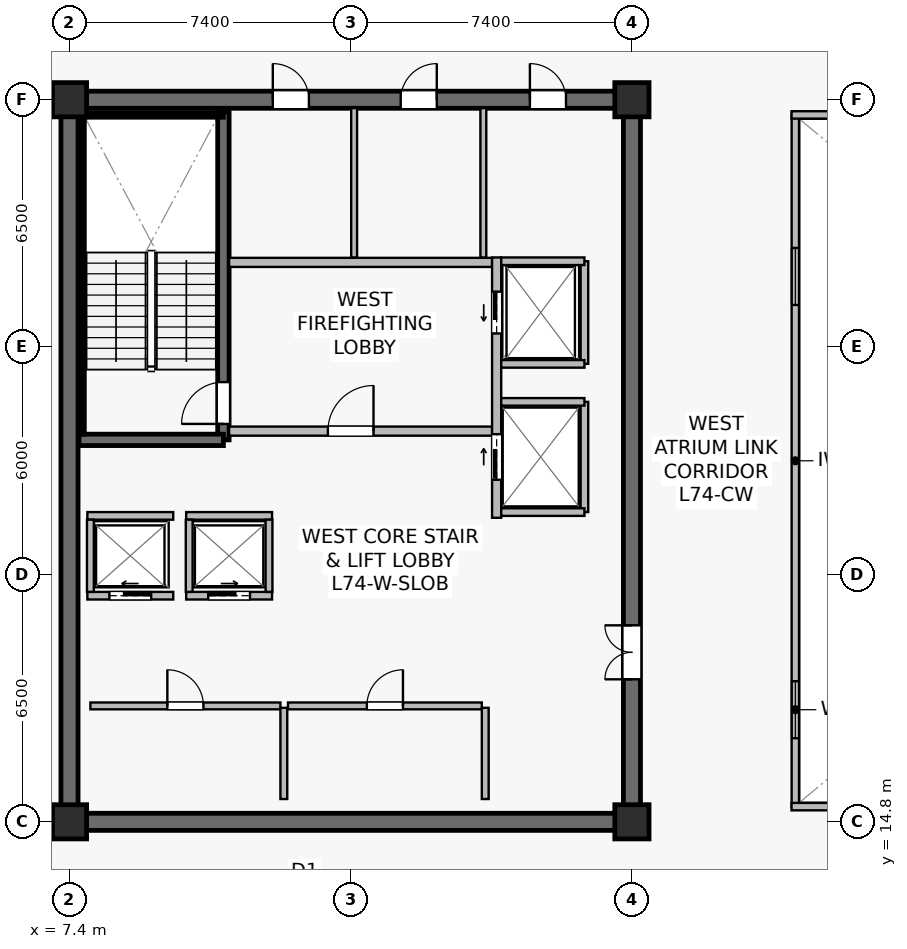
"""IFC4 building model, lengths in metres.
Left out: names, types, materials, properties, quantities, classifications, styles, units other than length and angle.
Written with IfcOpenShell. Run it as: python <this file> out.ifc"""

import sys

from ifc_helpers import new_model, si_unit, direction, frame, frame_2d, origin, origin_2d, place, context, subcontext, project, spatial, rectangle, extrude, source, transform, mapped, element, fill, save


model = new_model("IFC4")
c1 = context("Model", 3, precision=1e-05, world=origin(), true_north=direction((0.0, 1.0)))
c2 = subcontext(c1, "Body", "Model", "MODEL_VIEW")
j1 = project(units=[si_unit("LENGTHUNIT", "METRE"), si_unit("PLANEANGLEUNIT", "RADIAN")], contexts=[c1])
p1 = place(None, origin())
s1 = spatial("IfcSite", under=j1, at=p1, CompositionType="ELEMENT")
p2 = place(p1, origin())
s2 = spatial("IfcBuilding", under=s1, at=p2, CompositionType="ELEMENT")
p3 = place(p2, frame((0.0, 0.0, 310.2)))
s3 = spatial("IfcBuildingStorey", under=s2, at=p3, CompositionType="ELEMENT", Elevation=310.2)
p4 = place(p3, frame((7.175, 14.8, 0.0), z_axis=(0.0, 0.0, 1.0), x_axis=(1.0, 0.0, 0.0)))
e1 = element("IfcWall", 1, at=p4, inside=s3, PredefinedType="SHEAR", context=c2, shape_type="SweptSolid", body=[
    extrude(rectangle(XDim=15.25, YDim=0.45, at=frame_2d((7.625, 0.0))), origin(), (0.0, 0.0, 1.0), 3.9),
])
p5 = place(p3, frame((7.175, 33.8, 0.0), z_axis=(0.0, 0.0, 1.0), x_axis=(1.0, 0.0, 0.0)))
e2 = element("IfcWall", 2, at=p5, inside=s3, PredefinedType="SHEAR", context=c2, shape_type="SweptSolid", body=[
    extrude(rectangle(XDim=15.25, YDim=0.45, at=frame_2d((7.625, 0.0))), origin(), (0.0, 0.0, 1.0), 3.9),
])
p6 = place(p5, frame((5.575, 0.0, 0.0)))
e3 = element("IfcOpeningElement", 3, at=p6, cuts=e2, PredefinedType="OPENING", context=c2, shape_type="SweptSolid", body=[
    extrude(rectangle(XDim=0.95, YDim=2.15, at=frame_2d((0.475, 1.075))), frame((0.0, 0.235, 0.0), z_axis=(0.0, -1.0, 0.0), x_axis=(1.0, 0.0, 0.0)), (0.0, 0.0, 1.0), 0.47),
])
p7 = place(p5, frame((8.94, 0.0, 0.0)))
e4 = element("IfcOpeningElement", 4, at=p7, cuts=e2, PredefinedType="OPENING", context=c2, shape_type="SweptSolid", body=[
    extrude(rectangle(XDim=0.95, YDim=2.15, at=frame_2d((0.475, 1.075))), frame((0.0, 0.235, 0.0), z_axis=(0.0, -1.0, 0.0), x_axis=(1.0, 0.0, 0.0)), (0.0, 0.0, 1.0), 0.47),
])
p8 = place(p5, frame((12.34, 0.0, 0.0)))
e5 = element("IfcOpeningElement", 5, at=p8, cuts=e2, PredefinedType="OPENING", context=c2, shape_type="SweptSolid", body=[
    extrude(rectangle(XDim=0.95, YDim=2.15, at=frame_2d((0.475, 1.075))), frame((0.0, 0.235, 0.0), z_axis=(0.0, -1.0, 0.0), x_axis=(1.0, 0.0, 0.0)), (0.0, 0.0, 1.0), 0.47),
])
p9 = place(p3, frame((7.4, 15.025, 0.0), z_axis=(0.0, 0.0, 1.0), x_axis=(0.0, 1.0, 0.0)))
e6 = element("IfcWall", 6, at=p9, inside=s3, PredefinedType="SHEAR", context=c2, shape_type="SweptSolid", body=[
    extrude(rectangle(XDim=18.55, YDim=0.45, at=frame_2d((9.275, 0.0))), origin(), (0.0, 0.0, 1.0), 3.9),
])
p10 = place(p3, frame((22.2, 15.025, 0.0), z_axis=(0.0, 0.0, 1.0), x_axis=(0.0, 1.0, 0.0)))
e7 = element("IfcWall", 7, at=p10, inside=s3, PredefinedType="SHEAR", context=c2, shape_type="SweptSolid", body=[
    extrude(rectangle(XDim=18.55, YDim=0.45, at=frame_2d((9.275, 0.0))), origin(), (0.0, 0.0, 1.0), 3.9),
])
p11 = place(p10, frame((3.525, 0.0, 0.0)))
e8 = element("IfcOpeningElement", 8, at=p11, cuts=e7, PredefinedType="OPENING", context=c2, shape_type="SweptSolid", body=[
    extrude(rectangle(XDim=1.42, YDim=2.2, at=frame_2d((0.71, 1.1))), frame((0.0, 0.235, 0.0), z_axis=(0.0, -1.0, 0.0), x_axis=(1.0, 0.0, 0.0)), (0.0, 0.0, 1.0), 0.47),
])
p12 = place(p3, frame((11.45, 24.85, 0.0), z_axis=(0.0, 0.0, 1.0), x_axis=(0.0, 1.0, 0.0)))
e9 = element("IfcWall", 9, at=p12, inside=s3, PredefinedType="SHEAR", context=c2, shape_type="SweptSolid", body=[
    extrude(rectangle(XDim=8.63, YDim=0.3, at=frame_2d((4.315, 0.0))), origin(), (0.0, 0.0, 1.0), 3.9),
])
p13 = place(p12, frame((0.42, 0.0, 0.0)))
e10 = element("IfcOpeningElement", 10, at=p13, cuts=e9, PredefinedType="OPENING", context=c2, shape_type="SweptSolid", body=[
    extrude(rectangle(XDim=1.1, YDim=2.15, at=frame_2d((0.55, 1.075))), frame((0.0, 0.16, 0.0), z_axis=(0.0, -1.0, 0.0), x_axis=(1.0, 0.0, 0.0)), (0.0, 0.0, 1.0), 0.32),
])
p14 = place(p3, frame((7.65, 24.85, 0.0), z_axis=(0.0, 0.0, 1.0), x_axis=(1.0, 0.0, 0.0)))
e11 = element("IfcWall", 11, at=p14, inside=s3, PredefinedType="SHEAR", context=c2, shape_type="SweptSolid", body=[
    extrude(rectangle(XDim=3.8, YDim=0.3, at=frame_2d((1.9, 0.0))), origin(), (0.0, 0.0, 1.0), 3.9),
])
p15 = place(p3, frame((7.73, 33.4, 0.0), z_axis=(0.0, 0.0, 1.0), x_axis=(1.0, 0.0, 0.0)))
e12 = element("IfcWall", 12, at=p15, inside=s3, PredefinedType="SOLIDWALL", context=c2, shape_type="SweptSolid", body=[
    extrude(rectangle(XDim=3.72, YDim=0.12, at=frame_2d((1.86, 0.0))), origin(), (0.0, 0.0, 1.0), 3.9),
])
p16 = place(p3, frame((7.73, 25.0, 0.0), z_axis=(0.0, 0.0, 1.0), x_axis=(0.0, 1.0, 0.0)))
e13 = element("IfcWall", 13, at=p16, inside=s3, PredefinedType="SOLIDWALL", context=c2, shape_type="SweptSolid", body=[
    extrude(rectangle(XDim=8.32, YDim=0.12, at=frame_2d((4.16, 0.0))), origin(), (0.0, 0.0, 1.0), 3.9),
])
m1 = source(origin(), c2, "Body", "SweptSolid", [
    extrude(rectangle(XDim=0.9, YDim=0.9, at=origin_2d()), origin(), (0.0, 0.0, 1.0), 4.2),
])
for number, where, z_axis, x_axis in (
    (14, (7.4, 14.8, 0.0), (0.0, 0.0, 1.0), (1.0, 0.0, 0.0)),
    (15, (22.2, 14.8, 0.0), (0.0, 0.0, 1.0), (1.0, 0.0, 0.0)),
    (16, (7.4, 33.8, 0.0), (0.0, 0.0, 1.0), (1.0, 0.0, 0.0)),
    (17, (22.2, 33.8, 0.0), (0.0, 0.0, 1.0), (1.0, 0.0, 0.0)),
):
    element("IfcColumn", number, at=place(p3, frame(where, z_axis=z_axis, x_axis=x_axis)), inside=s3, PredefinedType="COLUMN", context=c2, shape_type="MappedRepresentation", body=[
        mapped(m1, transform((0.0, 0.0, 0.0), scale=1.0)),
    ])
p17 = place(p3, frame((11.6, 25.08, 0.0), z_axis=(0.0, 0.0, 1.0), x_axis=(1.0, 0.0, 0.0)))
e18 = element("IfcWall", 18, at=p17, inside=s3, PredefinedType="SOLIDWALL", context=c2, shape_type="SweptSolid", body=[
    extrude(rectangle(XDim=6.92, YDim=0.24, at=frame_2d((3.46, 0.0))), origin(), (0.0, 0.0, 1.0), 3.297),
])
p18 = place(p17, frame((2.6, 0.0, 0.0)))
e19 = element("IfcOpeningElement", 19, at=p18, cuts=e18, PredefinedType="OPENING", context=c2, shape_type="SweptSolid", body=[
    extrude(rectangle(XDim=1.2, YDim=2.16, at=frame_2d((0.6, 1.08))), frame((0.0, 0.13, 0.0), z_axis=(0.0, -1.0, 0.0), x_axis=(1.0, 0.0, 0.0)), (0.0, 0.0, 1.0), 0.26),
])
p19 = place(p3, frame((11.6, 29.52, 0.0), z_axis=(0.0, 0.0, 1.0), x_axis=(1.0, 0.0, 0.0)))
e20 = element("IfcWall", 20, at=p19, inside=s3, PredefinedType="SOLIDWALL", context=c2, shape_type="SweptSolid", body=[
    extrude(rectangle(XDim=6.92, YDim=0.24, at=frame_2d((3.46, 0.0))), origin(), (0.0, 0.0, 1.0), 3.297),
])
p20 = place(p3, frame((18.64, 22.8, 0.0), z_axis=(0.0, 0.0, 1.0), x_axis=(0.0, 1.0, 0.0)))
e21 = element("IfcWall", 21, at=p20, inside=s3, PredefinedType="SOLIDWALL", context=c2, shape_type="SweptSolid", body=[
    extrude(rectangle(XDim=6.85, YDim=0.24, at=frame_2d((3.425, 0.0))), origin(), (0.0, 0.0, 1.0), 3.035),
])
p21 = place(p20, frame((4.85, 0.0, 0.0)))
e22 = element("IfcOpeningElement", 22, at=p21, cuts=e21, PredefinedType="OPENING", context=c2, shape_type="SweptSolid", body=[
    extrude(rectangle(XDim=1.1, YDim=2.22, at=frame_2d((0.55, 1.11))), frame((0.0, 0.13, 0.0), z_axis=(0.0, -1.0, 0.0), x_axis=(1.0, 0.0, 0.0)), (0.0, 0.0, 1.0), 0.26),
])
p22 = place(p20, frame((1.0, 0.0, 0.0)))
e23 = element("IfcOpeningElement", 23, at=p22, cuts=e21, PredefinedType="OPENING", context=c2, shape_type="SweptSolid", body=[
    extrude(rectangle(XDim=1.2, YDim=2.22, at=frame_2d((0.6, 1.11))), frame((0.0, 0.13, 0.0), z_axis=(0.0, -1.0, 0.0), x_axis=(1.0, 0.0, 0.0)), (0.0, 0.0, 1.0), 0.26),
])
p23 = place(p3, frame((7.87, 20.75, 0.0), z_axis=(0.0, 0.0, 1.0), x_axis=(1.0, 0.0, 0.0)))
e24 = element("IfcWall", 24, at=p23, inside=s3, PredefinedType="SOLIDWALL", context=c2, shape_type="SweptSolid", body=[
    extrude(rectangle(XDim=2.26, YDim=0.2, at=frame_2d((1.13, 0.0))), origin(), (0.0, 0.0, 1.0), 3.9),
])
p24 = place(p23, frame((0.58, 0.0, 0.0)))
e25 = element("IfcOpeningElement", 25, at=p24, cuts=e24, PredefinedType="OPENING", context=c2, shape_type="SweptSolid", body=[
    extrude(rectangle(XDim=1.1, YDim=2.22, at=frame_2d((0.55, 1.11))), frame((0.0, 0.11, 0.0), z_axis=(0.0, -1.0, 0.0), x_axis=(1.0, 0.0, 0.0)), (0.0, 0.0, 1.0), 0.22),
])
p25 = place(p3, frame((7.87, 22.85, 0.0), z_axis=(0.0, 0.0, 1.0), x_axis=(1.0, 0.0, 0.0)))
e26 = element("IfcWall", 26, at=p25, inside=s3, PredefinedType="SOLIDWALL", context=c2, shape_type="SweptSolid", body=[
    extrude(rectangle(XDim=2.26, YDim=0.2, at=frame_2d((1.13, 0.0))), origin(), (0.0, 0.0, 1.0), 3.9),
])
p26 = place(p3, frame((7.95, 20.85, 0.0), z_axis=(0.0, 0.0, 1.0), x_axis=(0.0, 1.0, 0.0)))
e27 = element("IfcWall", 27, at=p26, inside=s3, PredefinedType="SOLIDWALL", context=c2, shape_type="SweptSolid", body=[
    extrude(rectangle(XDim=1.9, YDim=0.18, at=frame_2d((0.95, 0.0))), origin(), (0.0, 0.0, 1.0), 3.9),
])
p27 = place(p3, frame((10.47, 20.75, 0.0), z_axis=(0.0, 0.0, 1.0), x_axis=(1.0, 0.0, 0.0)))
e28 = element("IfcWall", 28, at=p27, inside=s3, PredefinedType="SOLIDWALL", context=c2, shape_type="SweptSolid", body=[
    extrude(rectangle(XDim=2.26, YDim=0.2, at=frame_2d((1.13, 0.0))), origin(), (0.0, 0.0, 1.0), 3.9),
])
p28 = place(p27, frame((0.58, 0.0, 0.0)))
e29 = element("IfcOpeningElement", 29, at=p28, cuts=e28, PredefinedType="OPENING", context=c2, shape_type="SweptSolid", body=[
    extrude(rectangle(XDim=1.1, YDim=2.22, at=frame_2d((0.55, 1.11))), frame((0.0, 0.11, 0.0), z_axis=(0.0, -1.0, 0.0), x_axis=(1.0, 0.0, 0.0)), (0.0, 0.0, 1.0), 0.22),
])
p29 = place(p3, frame((10.47, 22.85, 0.0), z_axis=(0.0, 0.0, 1.0), x_axis=(1.0, 0.0, 0.0)))
e30 = element("IfcWall", 30, at=p29, inside=s3, PredefinedType="SOLIDWALL", context=c2, shape_type="SweptSolid", body=[
    extrude(rectangle(XDim=2.26, YDim=0.2, at=frame_2d((1.13, 0.0))), origin(), (0.0, 0.0, 1.0), 3.9),
])
for number, where, z_axis, x_axis in (
    (31, (10.55, 20.85, 0.0), (0.0, 0.0, 1.0), (0.0, 1.0, 0.0)),
    (32, (12.65, 20.85, 0.0), (0.0, 0.0, 1.0), (0.0, 1.0, 0.0)),
):
    element("IfcWall", number, at=place(p3, frame(where, z_axis=z_axis, x_axis=x_axis)), inside=s3, PredefinedType="SOLIDWALL", context=c2, shape_type="SweptSolid", body=[
        extrude(rectangle(XDim=1.9, YDim=0.18, at=frame_2d((0.95, 0.0))), origin(), (0.0, 0.0, 1.0), 3.9),
    ])
p30 = place(p3, frame((20.95, 26.85, 0.0), z_axis=(0.0, 0.0, 1.0), x_axis=(0.0, 1.0, 0.0)))
e33 = element("IfcWall", 33, at=p30, inside=s3, PredefinedType="SOLIDWALL", context=c2, shape_type="SweptSolid", body=[
    extrude(rectangle(XDim=2.7, YDim=0.2, at=frame_2d((1.35, 0.0))), origin(), (0.0, 0.0, 1.0), 3.9),
])
p31 = place(p3, frame((18.76, 29.55, 0.0), z_axis=(0.0, 0.0, 1.0), x_axis=(1.0, 0.0, 0.0)))
e34 = element("IfcWall", 34, at=p31, inside=s3, PredefinedType="SOLIDWALL", context=c2, shape_type="SweptSolid", body=[
    extrude(rectangle(XDim=2.19, YDim=0.2, at=frame_2d((1.095, 0.0))), origin(), (0.0, 0.0, 1.0), 3.9),
])
p32 = place(p3, frame((18.76, 26.85, 0.0), z_axis=(0.0, 0.0, 1.0), x_axis=(1.0, 0.0, 0.0)))
e35 = element("IfcWall", 35, at=p32, inside=s3, PredefinedType="SOLIDWALL", context=c2, shape_type="SweptSolid", body=[
    extrude(rectangle(XDim=2.19, YDim=0.2, at=frame_2d((1.095, 0.0))), origin(), (0.0, 0.0, 1.0), 3.297),
])
p33 = place(p3, frame((20.95, 22.95, 0.0), z_axis=(0.0, 0.0, 1.0), x_axis=(0.0, 1.0, 0.0)))
e36 = element("IfcWall", 36, at=p33, inside=s3, PredefinedType="SOLIDWALL", context=c2, shape_type="SweptSolid", body=[
    extrude(rectangle(XDim=2.9, YDim=0.2, at=frame_2d((1.45, 0.0))), origin(), (0.0, 0.0, 1.0), 3.035),
])
for number, where, z_axis, x_axis in (
    (37, (18.76, 25.85, 0.0), (0.0, 0.0, 1.0), (1.0, 0.0, 0.0)),
    (38, (18.76, 22.95, 0.0), (0.0, 0.0, 1.0), (1.0, 0.0, 0.0)),
):
    element("IfcWall", number, at=place(p3, frame(where, z_axis=z_axis, x_axis=x_axis)), inside=s3, PredefinedType="SOLIDWALL", context=c2, shape_type="SweptSolid", body=[
        extrude(rectangle(XDim=2.19, YDim=0.2, at=frame_2d((1.095, 0.0))), origin(), (0.0, 0.0, 1.0), 3.9),
    ])
p34 = place(p3, frame((7.95, 17.85, 0.0), z_axis=(0.0, 0.0, 1.0), x_axis=(1.0, 0.0, 0.0)))
e39 = element("IfcWall", 39, at=p34, inside=s3, PredefinedType="SOLIDWALL", context=c2, shape_type="SweptSolid", body=[
    extrude(rectangle(XDim=5.0, YDim=0.18, at=frame_2d((2.5, 0.0))), origin(), (0.0, 0.0, 1.0), 3.9),
])
p35 = place(p34, frame((2.025, 0.0, 0.0)))
e40 = element("IfcOpeningElement", 40, at=p35, cuts=e39, PredefinedType="OPENING", context=c2, shape_type="SweptSolid", body=[
    extrude(rectangle(XDim=0.95, YDim=2.15, at=frame_2d((0.475, 1.075))), frame((0.0, 0.1, 0.0), z_axis=(0.0, -1.0, 0.0), x_axis=(1.0, 0.0, 0.0)), (0.0, 0.0, 1.0), 0.2),
])
p36 = place(p3, frame((13.04, 15.4, 0.0), z_axis=(0.0, 0.0, 1.0), x_axis=(0.0, 1.0, 0.0)))
e41 = element("IfcWall", 41, at=p36, inside=s3, PredefinedType="SOLIDWALL", context=c2, shape_type="SweptSolid", body=[
    extrude(rectangle(XDim=2.4, YDim=0.18, at=frame_2d((1.2, 0.0))), origin(), (0.0, 0.0, 1.0), 3.9),
])
p37 = place(p3, frame((13.15, 17.85, 0.0), z_axis=(0.0, 0.0, 1.0), x_axis=(1.0, 0.0, 0.0)))
e42 = element("IfcWall", 42, at=p37, inside=s3, PredefinedType="SOLIDWALL", context=c2, shape_type="SweptSolid", body=[
    extrude(rectangle(XDim=5.1, YDim=0.18, at=frame_2d((2.55, 0.0))), origin(), (0.0, 0.0, 1.0), 3.297),
])
p38 = place(p37, frame((2.075, 0.0, 0.0)))
e43 = element("IfcOpeningElement", 43, at=p38, cuts=e42, PredefinedType="OPENING", context=c2, shape_type="SweptSolid", body=[
    extrude(rectangle(XDim=0.95, YDim=2.15, at=frame_2d((0.475, 1.075))), frame((0.0, 0.1, 0.0), z_axis=(0.0, -1.0, 0.0), x_axis=(1.0, 0.0, 0.0)), (0.0, 0.0, 1.0), 0.2),
])
p39 = place(p3, frame((18.34, 15.4, 0.0), z_axis=(0.0, 0.0, 1.0), x_axis=(0.0, 1.0, 0.0)))
e44 = element("IfcWall", 44, at=p39, inside=s3, PredefinedType="SOLIDWALL", context=c2, shape_type="SweptSolid", body=[
    extrude(rectangle(XDim=2.4, YDim=0.18, at=frame_2d((1.2, 0.0))), origin(), (0.0, 0.0, 1.0), 3.9),
])
p40 = place(p3, frame((14.89, 29.65, 0.0), z_axis=(0.0, 0.0, 1.0), x_axis=(0.0, 1.0, 0.0)))
e45 = element("IfcWall", 45, at=p40, inside=s3, PredefinedType="PLUMBINGWALL", context=c2, shape_type="SweptSolid", body=[
    extrude(rectangle(XDim=3.93, YDim=0.155, at=frame_2d((1.965, 0.0))), origin(), (0.0, 0.0, 1.0), 3.297),
])
p41 = place(p3, frame((18.29, 29.65, 0.0), z_axis=(0.0, 0.0, 1.0), x_axis=(0.0, 1.0, 0.0)))
e46 = element("IfcWall", 46, at=p41, inside=s3, PredefinedType="PLUMBINGWALL", context=c2, shape_type="SweptSolid", body=[
    extrude(rectangle(XDim=3.93, YDim=0.155, at=frame_2d((1.965, 0.0))), origin(), (0.0, 0.0, 1.0), 3.9),
])
p42 = place(p3, frame((26.5, 15.2, 0.0), z_axis=(0.0, 0.0, 1.0), x_axis=(0.0, 1.0, 0.0)))
e47 = element("IfcWall", 47, at=p42, inside=s3, PredefinedType="SOLIDWALL", context=c2, shape_type="SweptSolid", body=[
    extrude(rectangle(XDim=18.2, YDim=0.195, at=frame_2d((9.1, 0.0))), origin(), (0.0, 0.0, 1.0), 3.9),
])
p43 = place(p42, frame((1.8, 0.0, 0.9)))
e48 = element("IfcOpeningElement", 48, at=p43, cuts=e47, PredefinedType="OPENING", context=c2, shape_type="SweptSolid", body=[
    extrude(rectangle(XDim=1.5, YDim=1.4, at=frame_2d((0.75, 0.7))), frame((0.0, 0.107, 0.0), z_axis=(0.0, -1.0, 0.0), x_axis=(1.0, 0.0, 0.0)), (0.0, 0.0, 1.0), 0.215),
])
p44 = place(p42, frame((13.2, 0.0, 0.9)))
e49 = element("IfcOpeningElement", 49, at=p44, cuts=e47, PredefinedType="OPENING", context=c2, shape_type="SweptSolid", body=[
    extrude(rectangle(XDim=1.5, YDim=1.4, at=frame_2d((0.75, 0.7))), frame((0.0, 0.107, 0.0), z_axis=(0.0, -1.0, 0.0), x_axis=(1.0, 0.0, 0.0)), (0.0, 0.0, 1.0), 0.215),
])
for number, where, z_axis, x_axis in (
    (50, (26.4, 15.2, 0.0), (0.0, 0.0, 1.0), (1.0, 0.0, 0.0)),
    (51, (26.4, 33.4, 0.0), (0.0, 0.0, 1.0), (1.0, 0.0, 0.0)),
):
    element("IfcWall", number, at=place(p3, frame(where, z_axis=z_axis, x_axis=x_axis)), inside=s3, PredefinedType="SOLIDWALL", context=c2, shape_type="SweptSolid", body=[
        extrude(rectangle(XDim=22.0, YDim=0.195, at=frame_2d((11.0, 0.0))), origin(), (0.0, 0.0, 1.0), 3.9),
    ])
m2 = source(origin(), c2, "Body", "SweptSolid", [
    extrude(rectangle(XDim=1.5, YDim=1.4, at=frame_2d((0.75, 0.7))), frame((0.0, 0.03, 0.0), z_axis=(0.0, -1.0, 0.0), x_axis=(1.0, 0.0, 0.0)), (0.0, 0.0, 1.0), 0.06),
])
p45 = place(p43, origin())
e52 = element("IfcWindow", 52, at=p45, inside=s3, PartitioningType="SINGLE_PANEL", PredefinedType="WINDOW", context=c2, shape_type="MappedRepresentation", body=[
    mapped(m2, transform((0.0, 0.0, 0.0), scale=1.0)),
])
fill(e48, e52)
p46 = place(p44, origin())
e53 = element("IfcWindow", 53, at=p46, inside=s3, PartitioningType="SINGLE_PANEL", PredefinedType="WINDOW", context=c2, shape_type="MappedRepresentation", body=[
    mapped(m2, transform((0.0, 0.0, 0.0), scale=1.0)),
])
fill(e49, e53)
m3 = source(origin(), c2, "Body", "SweptSolid", [
    extrude(rectangle(XDim=1.1, YDim=2.15, at=frame_2d((0.55, 1.075))), frame((0.0, 0.025, 0.0), z_axis=(0.0, -1.0, 0.0), x_axis=(1.0, 0.0, 0.0)), (0.0, 0.0, 1.0), 0.05),
])
p47 = place(p13, origin())
e54 = element("IfcDoor", 54, at=p47, inside=s3, OperationType="SINGLE_SWING_LEFT", PredefinedType="DOOR", context=c2, shape_type="MappedRepresentation", body=[
    mapped(m3, transform((0.0, 0.0, 0.0), scale=1.0)),
])
fill(e10, e54)
m4 = source(origin(), c2, "Body", "SweptSolid", [
    extrude(rectangle(XDim=1.2, YDim=2.16, at=frame_2d((0.6, 1.08))), frame((0.0, 0.025, 0.0), z_axis=(0.0, -1.0, 0.0), x_axis=(1.0, 0.0, 0.0)), (0.0, 0.0, 1.0), 0.05),
])
p48 = place(p18, origin())
e55 = element("IfcDoor", 55, at=p48, inside=s3, OperationType="SINGLE_SWING_RIGHT", PredefinedType="DOOR", context=c2, shape_type="MappedRepresentation", body=[
    mapped(m4, transform((0.0, 0.0, 0.0), scale=1.0)),
])
fill(e19, e55)
m5 = source(origin(), c2, "Body", "SweptSolid", [
    extrude(rectangle(XDim=1.1, YDim=2.22, at=frame_2d((0.55, 1.11))), frame((0.0, 0.025, 0.0), z_axis=(0.0, -1.0, 0.0), x_axis=(1.0, 0.0, 0.0)), (0.0, 0.0, 1.0), 0.05),
])
p49 = place(p24, origin())
e56 = element("IfcDoor", 56, at=p49, inside=s3, OperationType="SLIDING_TO_LEFT", PredefinedType="USERDEFINED", context=c2, shape_type="MappedRepresentation", body=[
    mapped(m5, transform((0.0, 0.0, 0.0), scale=1.0)),
])
fill(e25, e56)
p50 = place(p28, origin())
e57 = element("IfcDoor", 57, at=p50, inside=s3, OperationType="SLIDING_TO_RIGHT", PredefinedType="USERDEFINED", context=c2, shape_type="MappedRepresentation", body=[
    mapped(m5, transform((0.0, 0.0, 0.0), scale=1.0)),
])
fill(e29, e57)
p51 = place(p21, origin())
e58 = element("IfcDoor", 58, at=p51, inside=s3, OperationType="SLIDING_TO_LEFT", PredefinedType="USERDEFINED", context=c2, shape_type="MappedRepresentation", body=[
    mapped(m5, transform((0.0, 0.0, 0.0), scale=1.0)),
])
fill(e22, e58)
m6 = source(origin(), c2, "Body", "SweptSolid", [
    extrude(rectangle(XDim=1.2, YDim=2.22, at=frame_2d((0.6, 1.11))), frame((0.0, 0.025, 0.0), z_axis=(0.0, -1.0, 0.0), x_axis=(1.0, 0.0, 0.0)), (0.0, 0.0, 1.0), 0.05),
])
p52 = place(p22, origin())
e59 = element("IfcDoor", 59, at=p52, inside=s3, OperationType="SLIDING_TO_RIGHT", PredefinedType="USERDEFINED", context=c2, shape_type="MappedRepresentation", body=[
    mapped(m6, transform((0.0, 0.0, 0.0), scale=1.0)),
])
fill(e23, e59)
m7 = source(origin(), c2, "Body", "SweptSolid", [
    extrude(rectangle(XDim=0.95, YDim=2.15, at=frame_2d((0.475, 1.075))), frame((0.0, 0.025, 0.0), z_axis=(0.0, -1.0, 0.0), x_axis=(1.0, 0.0, 0.0)), (0.0, 0.0, 1.0), 0.05),
])
p53 = place(p35, origin())
e60 = element("IfcDoor", 60, at=p53, inside=s3, OperationType="SINGLE_SWING_LEFT", PredefinedType="DOOR", context=c2, shape_type="MappedRepresentation", body=[
    mapped(m7, transform((0.0, 0.0, 0.0), scale=1.0)),
])
fill(e40, e60)
p54 = place(p38, origin())
e61 = element("IfcDoor", 61, at=p54, inside=s3, OperationType="SINGLE_SWING_RIGHT", PredefinedType="DOOR", context=c2, shape_type="MappedRepresentation", body=[
    mapped(m7, transform((0.0, 0.0, 0.0), scale=1.0)),
])
fill(e43, e61)
m8 = source(origin(), c2, "Body", "SweptSolid", [
    extrude(rectangle(XDim=1.42, YDim=2.2, at=frame_2d((0.71, 1.1))), frame((0.0, 0.025, 0.0), z_axis=(0.0, -1.0, 0.0), x_axis=(1.0, 0.0, 0.0)), (0.0, 0.0, 1.0), 0.05),
])
p55 = place(p11, origin())
e62 = element("IfcDoor", 62, at=p55, inside=s3, OperationType="DOUBLE_DOOR_SINGLE_SWING", PredefinedType="DOOR", context=c2, shape_type="MappedRepresentation", body=[
    mapped(m8, transform((0.0, 0.0, 0.0), scale=1.0)),
])
fill(e8, e62)
p56 = place(p6, origin())
e63 = element("IfcDoor", 63, at=p56, inside=s3, OperationType="SINGLE_SWING_LEFT", PredefinedType="DOOR", context=c2, shape_type="MappedRepresentation", body=[
    mapped(m7, transform((0.0, 0.0, 0.0), scale=1.0)),
])
fill(e3, e63)
p57 = place(p7, origin())
e64 = element("IfcDoor", 64, at=p57, inside=s3, OperationType="SINGLE_SWING_RIGHT", PredefinedType="DOOR", context=c2, shape_type="MappedRepresentation", body=[
    mapped(m7, transform((0.0, 0.0, 0.0), scale=1.0)),
])
fill(e4, e64)
p58 = place(p8, origin())
e65 = element("IfcDoor", 65, at=p58, inside=s3, OperationType="SINGLE_SWING_LEFT", PredefinedType="DOOR", context=c2, shape_type="MappedRepresentation", body=[
    mapped(m7, transform((0.0, 0.0, 0.0), scale=1.0)),
])
fill(e5, e65)
save(model, sys.argv[1])
